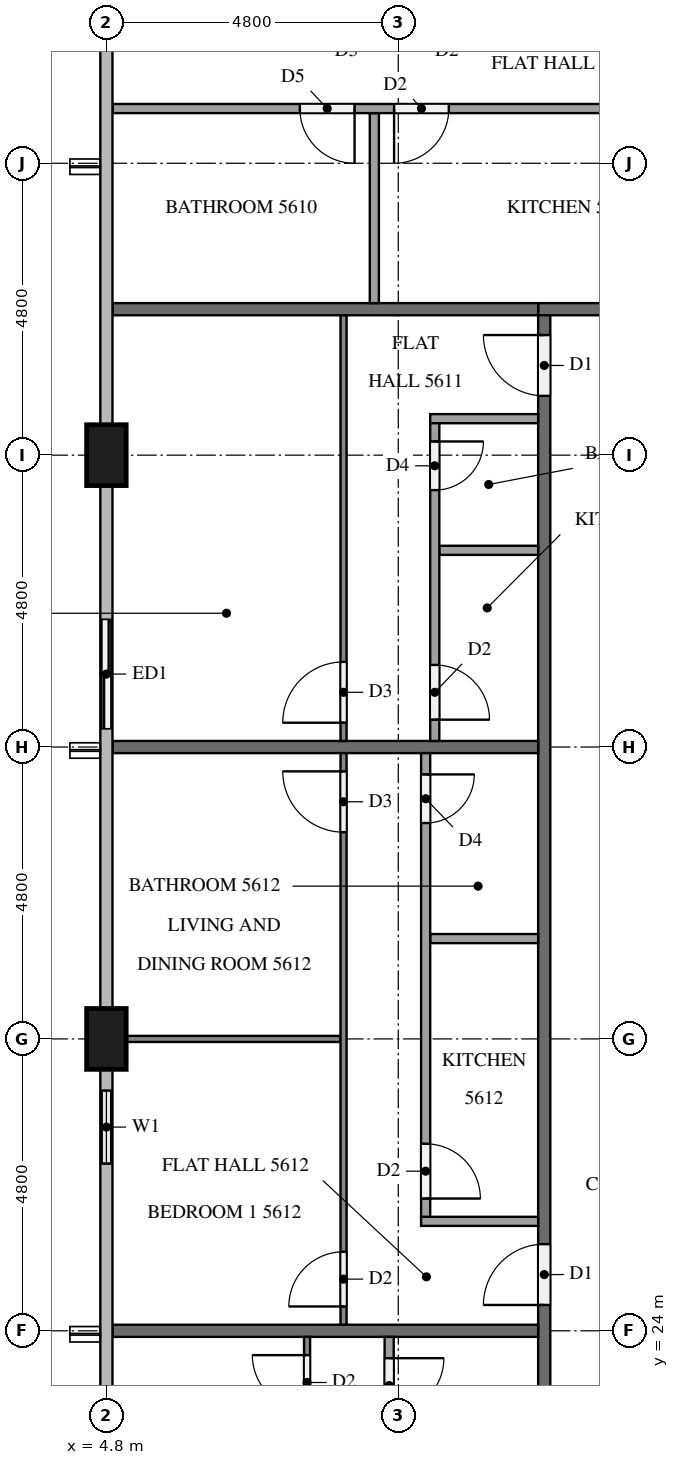
"""IFC4 building model, lengths in metres.
Left out: names, types, materials, properties, quantities, classifications, styles, units other than length and angle.
Written with IfcOpenShell. Run it as: python <this file> out.ifc"""

import sys

from ifc_helpers import new_model, si_unit, direction, frame, frame_2d, origin, origin_2d, place, context, subcontext, project, spatial, rectangle, extrude, element, fill, save


model = new_model("IFC4")
c1 = context("Model", 3, precision=1e-05, world=origin(), true_north=direction((0.0, 1.0)))
c2 = subcontext(c1, "Body", "Model", "MODEL_VIEW")
j1 = project(units=[si_unit("LENGTHUNIT", "METRE"), si_unit("PLANEANGLEUNIT", "RADIAN")], contexts=[c1])
p1 = place(None, origin())
s1 = spatial("IfcSite", under=j1, at=p1, CompositionType="ELEMENT")
p2 = place(p1, origin())
s2 = spatial("IfcBuilding", under=s1, at=p2, CompositionType="ELEMENT")
p3 = place(p2, frame((0.0, 0.0, 215.8)))
s3 = spatial("IfcBuildingStorey", under=s2, at=p3, CompositionType="ELEMENT", Elevation=215.8)
for number, where, z_axis, x_axis in (
    (1, (4.8, 38.4, 0.0), (0.0, 0.0, 1.0), (0.0, 1.0, 0.0)),
    (2, (4.8, 28.8, 0.0), (0.0, 0.0, 1.0), (0.0, 1.0, 0.0)),
):
    element("IfcColumn", number, at=place(p3, frame(where, z_axis=z_axis, x_axis=x_axis)), inside=s3, PredefinedType="COLUMN", context=c2, shape_type="SweptSolid", body=[
        extrude(rectangle(XDim=1.0, YDim=0.65, at=origin_2d()), origin(), (0.0, 0.0, 1.0), 3.2),
    ])
p4 = place(p3, frame((4.8, 36.0, 0.0), z_axis=(0.0, 0.0, 1.0), x_axis=(0.0, -1.0, 0.0)))
e3 = element("IfcWall", 3, at=p4, inside=s3, PredefinedType="SOLIDWALL", context=c2, shape_type="SweptSolid", body=[
    extrude(rectangle(XDim=2.4, YDim=0.15, at=frame_2d((1.2, 0.0))), origin(), (0.0, 0.0, 1.0), 3.2),
])
p5 = place(p4, frame((0.3, 0.0, 0.0)))
e4 = element("IfcOpeningElement", 4, at=p5, cuts=e3, PredefinedType="OPENING", context=c2, shape_type="SweptSolid", body=[
    extrude(rectangle(XDim=1.8, YDim=2.4, at=frame_2d((0.9, 1.2))), frame((0.0, 0.085, 0.0), z_axis=(0.0, -1.0, 0.0), x_axis=(1.0, 0.0, 0.0)), (0.0, 0.0, 1.0), 0.17),
])
p6 = place(p3, frame((4.8, 28.3, 0.0), z_axis=(0.0, 0.0, 1.0), x_axis=(0.0, -1.0, 0.0)))
e5 = element("IfcWall", 5, at=p6, inside=s3, PredefinedType="SOLIDWALL", context=c2, shape_type="SweptSolid", body=[
    extrude(rectangle(XDim=1.9, YDim=0.15, at=frame_2d((0.95, 0.0))), origin(), (0.0, 0.0, 1.0), 3.2),
])
p7 = place(p6, frame((0.35, 0.0, 0.9)))
e6 = element("IfcOpeningElement", 6, at=p7, cuts=e5, PredefinedType="OPENING", context=c2, shape_type="SweptSolid", body=[
    extrude(rectangle(XDim=1.2, YDim=1.4, at=frame_2d((0.6, 0.7))), frame((0.0, 0.085, 0.0), z_axis=(0.0, -1.0, 0.0), x_axis=(1.0, 0.0, 0.0)), (0.0, 0.0, 1.0), 0.17),
])
p8 = place(p3, frame((11.9, 40.8, 0.0), z_axis=(0.0, 0.0, 1.0), x_axis=(1.0, 0.0, 0.0)))
e7 = element("IfcWall", 7, at=p8, inside=s3, PredefinedType="PARTITIONING", context=c2, shape_type="SweptSolid", body=[
    extrude(rectangle(XDim=38.6, YDim=0.2, at=frame_2d((19.3, 0.0))), origin(), (0.0, 0.0, 1.0), 3.2),
])
p9 = place(p8, frame((36.525, 0.0, 0.0)))
e8 = element("IfcOpeningElement", 8, at=p9, cuts=e7, PredefinedType="OPENING", context=c2, shape_type="SweptSolid", body=[
    extrude(rectangle(XDim=1.0, YDim=2.1, at=frame_2d((0.5, 1.05))), frame((0.0, 0.11, 0.0), z_axis=(0.0, -1.0, 0.0), x_axis=(1.0, 0.0, 0.0)), (0.0, 0.0, 1.0), 0.22),
])
p10 = place(p8, frame((29.325, 0.0, 0.0)))
e9 = element("IfcOpeningElement", 9, at=p10, cuts=e7, PredefinedType="OPENING", context=c2, shape_type="SweptSolid", body=[
    extrude(rectangle(XDim=1.0, YDim=2.1, at=frame_2d((0.5, 1.05))), frame((0.0, 0.11, 0.0), z_axis=(0.0, -1.0, 0.0), x_axis=(1.0, 0.0, 0.0)), (0.0, 0.0, 1.0), 0.22),
])
p11 = place(p8, frame((12.525, 0.0, 0.0)))
e10 = element("IfcOpeningElement", 10, at=p11, cuts=e7, PredefinedType="OPENING", context=c2, shape_type="SweptSolid", body=[
    extrude(rectangle(XDim=1.0, YDim=2.1, at=frame_2d((0.5, 1.05))), frame((0.0, 0.11, 0.0), z_axis=(0.0, -1.0, 0.0), x_axis=(1.0, 0.0, 0.0)), (0.0, 0.0, 1.0), 0.22),
])
p12 = place(p8, frame((10.625, 0.0, 0.0)))
e11 = element("IfcOpeningElement", 11, at=p12, cuts=e7, PredefinedType="OPENING", context=c2, shape_type="SweptSolid", body=[
    extrude(rectangle(XDim=1.1, YDim=2.1, at=frame_2d((0.55, 1.05))), frame((0.0, 0.11, 0.0), z_axis=(0.0, -1.0, 0.0), x_axis=(1.0, 0.0, 0.0)), (0.0, 0.0, 1.0), 0.22),
])
p13 = place(p3, frame((12.0, 12.1, 0.0), z_axis=(0.0, 0.0, 1.0), x_axis=(0.0, 1.0, 0.0)))
e12 = element("IfcWall", 12, at=p13, inside=s3, PredefinedType="PARTITIONING", context=c2, shape_type="SweptSolid", body=[
    extrude(rectangle(XDim=28.6, YDim=0.2, at=frame_2d((14.3, 0.0))), origin(), (0.0, 0.0, 1.0), 3.2),
])
p14 = place(p13, frame((27.275, 0.0, 0.0)))
e13 = element("IfcOpeningElement", 13, at=p14, cuts=e12, PredefinedType="OPENING", context=c2, shape_type="SweptSolid", body=[
    extrude(rectangle(XDim=1.0, YDim=2.1, at=frame_2d((0.5, 1.05))), frame((0.0, 0.11, 0.0), z_axis=(0.0, -1.0, 0.0), x_axis=(1.0, 0.0, 0.0)), (0.0, 0.0, 1.0), 0.22),
])
p15 = place(p13, frame((12.325, 0.0, 0.0)))
e14 = element("IfcOpeningElement", 14, at=p15, cuts=e12, PredefinedType="OPENING", context=c2, shape_type="SweptSolid", body=[
    extrude(rectangle(XDim=1.0, YDim=2.1, at=frame_2d((0.5, 1.05))), frame((0.0, 0.11, 0.0), z_axis=(0.0, -1.0, 0.0), x_axis=(1.0, 0.0, 0.0)), (0.0, 0.0, 1.0), 0.22),
])
p16 = place(p13, frame((2.725, 0.0, 0.0)))
e15 = element("IfcOpeningElement", 15, at=p16, cuts=e12, PredefinedType="OPENING", context=c2, shape_type="SweptSolid", body=[
    extrude(rectangle(XDim=1.0, YDim=2.1, at=frame_2d((0.5, 1.05))), frame((0.0, 0.11, 0.0), z_axis=(0.0, -1.0, 0.0), x_axis=(1.0, 0.0, 0.0)), (0.0, 0.0, 1.0), 0.22),
])
p17 = place(p13, frame((0.875, 0.0, 0.0)))
e16 = element("IfcOpeningElement", 16, at=p17, cuts=e12, PredefinedType="OPENING", context=c2, shape_type="SweptSolid", body=[
    extrude(rectangle(XDim=1.0, YDim=2.1, at=frame_2d((0.5, 1.05))), frame((0.0, 0.11, 0.0), z_axis=(0.0, -1.0, 0.0), x_axis=(1.0, 0.0, 0.0)), (0.0, 0.0, 1.0), 0.22),
])
for number, where, z_axis, x_axis in (
    (17, (4.9, 40.8, 0.0), (0.0, 0.0, 1.0), (1.0, 0.0, 0.0)),
    (18, (4.9, 33.6, 0.0), (0.0, 0.0, 1.0), (1.0, 0.0, 0.0)),
    (19, (4.9, 24.0, 0.0), (0.0, 0.0, 1.0), (1.0, 0.0, 0.0)),
):
    element("IfcWall", number, at=place(p3, frame(where, z_axis=z_axis, x_axis=x_axis)), inside=s3, PredefinedType="PARTITIONING", context=c2, shape_type="SweptSolid", body=[
        extrude(rectangle(XDim=7.0, YDim=0.2, at=frame_2d((3.5, 0.0))), origin(), (0.0, 0.0, 1.0), 3.2),
    ])
p18 = place(p3, frame((9.206, 40.9, 0.0), z_axis=(0.0, 0.0, 1.0), x_axis=(0.0, 1.0, 0.0)))
e20 = element("IfcWall", 20, at=p18, inside=s3, PredefinedType="PARTITIONING", context=c2, shape_type="SweptSolid", body=[
    extrude(rectangle(XDim=3.125, YDim=0.15, at=frame_2d((1.562, 0.0))), origin(), (0.0, 0.0, 1.0), 3.2),
])
p19 = place(p3, frame((22.125, 44.1, 0.0), z_axis=(0.0, 0.0, 1.0), x_axis=(-1.0, 0.0, 0.0)))
e21 = element("IfcWall", 21, at=p19, inside=s3, PredefinedType="PARTITIONING", context=c2, shape_type="SweptSolid", body=[
    extrude(rectangle(XDim=17.225, YDim=0.15, at=frame_2d((8.613, 0.0))), origin(), (0.0, 0.0, 1.0), 3.2),
])
p20 = place(p19, frame((2.105, 0.0, 0.0)))
e22 = element("IfcOpeningElement", 22, at=p20, cuts=e21, PredefinedType="OPENING", context=c2, shape_type="SweptSolid", body=[
    extrude(rectangle(XDim=0.8, YDim=2.1, at=frame_2d((0.4, 1.05))), frame((0.0, 0.085, 0.0), z_axis=(0.0, -1.0, 0.0), x_axis=(1.0, 0.0, 0.0)), (0.0, 0.0, 1.0), 0.17),
])
p21 = place(p19, frame((3.555, 0.0, 0.0)))
e23 = element("IfcOpeningElement", 23, at=p21, cuts=e21, PredefinedType="OPENING", context=c2, shape_type="SweptSolid", body=[
    extrude(rectangle(XDim=0.8, YDim=2.1, at=frame_2d((0.4, 1.05))), frame((0.0, 0.085, 0.0), z_axis=(0.0, -1.0, 0.0), x_axis=(1.0, 0.0, 0.0)), (0.0, 0.0, 1.0), 0.17),
])
p22 = place(p19, frame((11.694, 0.0, 0.0)))
e24 = element("IfcOpeningElement", 24, at=p22, cuts=e21, PredefinedType="OPENING", context=c2, shape_type="SweptSolid", body=[
    extrude(rectangle(XDim=0.9, YDim=2.1, at=frame_2d((0.45, 1.05))), frame((0.0, 0.085, 0.0), z_axis=(0.0, -1.0, 0.0), x_axis=(1.0, 0.0, 0.0)), (0.0, 0.0, 1.0), 0.17),
])
p23 = place(p19, frame((13.244, 0.0, 0.0)))
e25 = element("IfcOpeningElement", 25, at=p23, cuts=e21, PredefinedType="OPENING", context=c2, shape_type="SweptSolid", body=[
    extrude(rectangle(XDim=0.9, YDim=2.1, at=frame_2d((0.45, 1.05))), frame((0.0, 0.085, 0.0), z_axis=(0.0, -1.0, 0.0), x_axis=(1.0, 0.0, 0.0)), (0.0, 0.0, 1.0), 0.17),
])
p24 = place(p3, frame((8.7, 33.7, 0.0), z_axis=(0.0, 0.0, 1.0), x_axis=(0.0, 1.0, 0.0)))
e26 = element("IfcWall", 26, at=p24, inside=s3, PredefinedType="PARTITIONING", context=c2, shape_type="SweptSolid", body=[
    extrude(rectangle(XDim=7.0, YDim=0.1, at=frame_2d((3.5, 0.0))), origin(), (0.0, 0.0, 1.0), 3.2),
])
p25 = place(p24, frame((0.3, 0.0, 0.0)))
e27 = element("IfcOpeningElement", 27, at=p25, cuts=e26, PredefinedType="OPENING", context=c2, shape_type="SweptSolid", body=[
    extrude(rectangle(XDim=1.0, YDim=2.1, at=frame_2d((0.5, 1.05))), frame((0.0, 0.06, 0.0), z_axis=(0.0, -1.0, 0.0), x_axis=(1.0, 0.0, 0.0)), (0.0, 0.0, 1.0), 0.12),
])
p26 = place(p3, frame((11.9, 36.835, 0.0), z_axis=(0.0, 0.0, 1.0), x_axis=(-1.0, 0.0, 0.0)))
e28 = element("IfcWall", 28, at=p26, inside=s3, PredefinedType="PARTITIONING", context=c2, shape_type="SweptSolid", body=[
    extrude(rectangle(XDim=1.625, YDim=0.15, at=frame_2d((0.812, 0.0))), origin(), (0.0, 0.0, 1.0), 3.2),
])
p27 = place(p3, frame((11.9, 39.0, 0.0), z_axis=(0.0, 0.0, 1.0), x_axis=(-1.0, 0.0, 0.0)))
e29 = element("IfcWall", 29, at=p27, inside=s3, PredefinedType="PARTITIONING", context=c2, shape_type="SweptSolid", body=[
    extrude(rectangle(XDim=1.775, YDim=0.15, at=frame_2d((0.887, 0.0))), origin(), (0.0, 0.0, 1.0), 3.2),
])
p28 = place(p3, frame((10.2, 38.925, 0.0), z_axis=(0.0, 0.0, 1.0), x_axis=(0.0, -1.0, 0.0)))
e30 = element("IfcWall", 30, at=p28, inside=s3, PredefinedType="PARTITIONING", context=c2, shape_type="SweptSolid", body=[
    extrude(rectangle(XDim=5.225, YDim=0.15, at=frame_2d((2.613, 0.0))), origin(), (0.0, 0.0, 1.0), 3.2),
])
p29 = place(p28, frame((0.3, 0.0, 0.0)))
e31 = element("IfcOpeningElement", 31, at=p29, cuts=e30, PredefinedType="OPENING", context=c2, shape_type="SweptSolid", body=[
    extrude(rectangle(XDim=0.8, YDim=2.1, at=frame_2d((0.4, 1.05))), frame((0.0, 0.085, 0.0), z_axis=(0.0, -1.0, 0.0), x_axis=(1.0, 0.0, 0.0)), (0.0, 0.0, 1.0), 0.17),
])
p30 = place(p28, frame((3.975, 0.0, 0.0)))
e32 = element("IfcOpeningElement", 32, at=p30, cuts=e30, PredefinedType="OPENING", context=c2, shape_type="SweptSolid", body=[
    extrude(rectangle(XDim=0.9, YDim=2.1, at=frame_2d((0.45, 1.05))), frame((0.0, 0.085, 0.0), z_axis=(0.0, -1.0, 0.0), x_axis=(1.0, 0.0, 0.0)), (0.0, 0.0, 1.0), 0.17),
])
p31 = place(p3, frame((8.65, 28.8, 0.0), z_axis=(0.0, 0.0, 1.0), x_axis=(-1.0, 0.0, 0.0)))
e33 = element("IfcWall", 33, at=p31, inside=s3, PredefinedType="PARTITIONING", context=c2, shape_type="SweptSolid", body=[
    extrude(rectangle(XDim=3.525, YDim=0.1, at=frame_2d((1.762, 0.0))), origin(), (0.0, 0.0, 1.0), 3.2),
])
p32 = place(p3, frame((8.7, 24.1, 0.0), z_axis=(0.0, 0.0, 1.0), x_axis=(0.0, 1.0, 0.0)))
e34 = element("IfcWall", 34, at=p32, inside=s3, PredefinedType="PARTITIONING", context=c2, shape_type="SweptSolid", body=[
    extrude(rectangle(XDim=9.4, YDim=0.1, at=frame_2d((4.7, 0.0))), origin(), (0.0, 0.0, 1.0), 3.2),
])
p33 = place(p32, frame((0.3, 0.0, 0.0)))
e35 = element("IfcOpeningElement", 35, at=p33, cuts=e34, PredefinedType="OPENING", context=c2, shape_type="SweptSolid", body=[
    extrude(rectangle(XDim=0.9, YDim=2.1, at=frame_2d((0.45, 1.05))), frame((0.0, 0.06, 0.0), z_axis=(0.0, -1.0, 0.0), x_axis=(1.0, 0.0, 0.0)), (0.0, 0.0, 1.0), 0.12),
])
p34 = place(p32, frame((8.1, 0.0, 0.0)))
e36 = element("IfcOpeningElement", 36, at=p34, cuts=e34, PredefinedType="OPENING", context=c2, shape_type="SweptSolid", body=[
    extrude(rectangle(XDim=1.0, YDim=2.1, at=frame_2d((0.5, 1.05))), frame((0.0, 0.06, 0.0), z_axis=(0.0, -1.0, 0.0), x_axis=(1.0, 0.0, 0.0)), (0.0, 0.0, 1.0), 0.12),
])
p35 = place(p3, frame((11.9, 30.45, 0.0), z_axis=(0.0, 0.0, 1.0), x_axis=(-1.0, 0.0, 0.0)))
e37 = element("IfcWall", 37, at=p35, inside=s3, PredefinedType="PARTITIONING", context=c2, shape_type="SweptSolid", body=[
    extrude(rectangle(XDim=1.775, YDim=0.15, at=frame_2d((0.887, 0.0))), origin(), (0.0, 0.0, 1.0), 3.2),
])
p36 = place(p3, frame((11.9, 25.8, 0.0), z_axis=(0.0, 0.0, 1.0), x_axis=(-1.0, 0.0, 0.0)))
e38 = element("IfcWall", 38, at=p36, inside=s3, PredefinedType="PARTITIONING", context=c2, shape_type="SweptSolid", body=[
    extrude(rectangle(XDim=1.925, YDim=0.15, at=frame_2d((0.962, 0.0))), origin(), (0.0, 0.0, 1.0), 3.2),
])
p37 = place(p3, frame((10.05, 33.5, 0.0), z_axis=(0.0, 0.0, 1.0), x_axis=(0.0, -1.0, 0.0)))
e39 = element("IfcWall", 39, at=p37, inside=s3, PredefinedType="PARTITIONING", context=c2, shape_type="SweptSolid", body=[
    extrude(rectangle(XDim=7.625, YDim=0.15, at=frame_2d((3.812, 0.0))), origin(), (0.0, 0.0, 1.0), 3.2),
])
p38 = place(p37, frame((6.425, 0.0, 0.0)))
e40 = element("IfcOpeningElement", 40, at=p38, cuts=e39, PredefinedType="OPENING", context=c2, shape_type="SweptSolid", body=[
    extrude(rectangle(XDim=0.9, YDim=2.1, at=frame_2d((0.45, 1.05))), frame((0.0, 0.085, 0.0), z_axis=(0.0, -1.0, 0.0), x_axis=(1.0, 0.0, 0.0)), (0.0, 0.0, 1.0), 0.17),
])
p39 = place(p37, frame((0.35, 0.0, 0.0)))
e41 = element("IfcOpeningElement", 41, at=p39, cuts=e39, PredefinedType="OPENING", context=c2, shape_type="SweptSolid", body=[
    extrude(rectangle(XDim=0.8, YDim=2.1, at=frame_2d((0.4, 1.05))), frame((0.0, 0.085, 0.0), z_axis=(0.0, -1.0, 0.0), x_axis=(1.0, 0.0, 0.0)), (0.0, 0.0, 1.0), 0.17),
])
p40 = place(p3, frame((8.1, 14.5, 0.0), z_axis=(0.0, 0.0, 1.0), x_axis=(0.0, 1.0, 0.0)))
e42 = element("IfcWall", 42, at=p40, inside=s3, PredefinedType="PARTITIONING", context=c2, shape_type="SweptSolid", body=[
    extrude(rectangle(XDim=9.4, YDim=0.1, at=frame_2d((4.7, 0.0))), origin(), (0.0, 0.0, 1.0), 3.2),
])
p41 = place(p40, frame((0.3, 0.0, 0.0)))
e43 = element("IfcOpeningElement", 43, at=p41, cuts=e42, PredefinedType="OPENING", context=c2, shape_type="SweptSolid", body=[
    extrude(rectangle(XDim=1.0, YDim=2.1, at=frame_2d((0.5, 1.05))), frame((0.0, 0.06, 0.0), z_axis=(0.0, -1.0, 0.0), x_axis=(1.0, 0.0, 0.0)), (0.0, 0.0, 1.0), 0.12),
])
p42 = place(p40, frame((8.2, 0.0, 0.0)))
e44 = element("IfcOpeningElement", 44, at=p42, cuts=e42, PredefinedType="OPENING", context=c2, shape_type="SweptSolid", body=[
    extrude(rectangle(XDim=0.9, YDim=2.1, at=frame_2d((0.45, 1.05))), frame((0.0, 0.06, 0.0), z_axis=(0.0, -1.0, 0.0), x_axis=(1.0, 0.0, 0.0)), (0.0, 0.0, 1.0), 0.12),
])
p43 = place(p3, frame((9.45, 23.9, 0.0), z_axis=(0.0, 0.0, 1.0), x_axis=(0.0, -1.0, 0.0)))
e45 = element("IfcWall", 45, at=p43, inside=s3, PredefinedType="PARTITIONING", context=c2, shape_type="SweptSolid", body=[
    extrude(rectangle(XDim=7.625, YDim=0.15, at=frame_2d((3.812, 0.0))), origin(), (0.0, 0.0, 1.0), 3.2),
])
p44 = place(p43, frame((6.525, 0.0, 0.0)))
e46 = element("IfcOpeningElement", 46, at=p44, cuts=e45, PredefinedType="OPENING", context=c2, shape_type="SweptSolid", body=[
    extrude(rectangle(XDim=0.8, YDim=2.1, at=frame_2d((0.4, 1.05))), frame((0.0, 0.085, 0.0), z_axis=(0.0, -1.0, 0.0), x_axis=(1.0, 0.0, 0.0)), (0.0, 0.0, 1.0), 0.17),
])
p45 = place(p43, frame((0.35, 0.0, 0.0)))
e47 = element("IfcOpeningElement", 47, at=p45, cuts=e45, PredefinedType="OPENING", context=c2, shape_type="SweptSolid", body=[
    extrude(rectangle(XDim=0.9, YDim=2.1, at=frame_2d((0.45, 1.05))), frame((0.0, 0.085, 0.0), z_axis=(0.0, -1.0, 0.0), x_axis=(1.0, 0.0, 0.0)), (0.0, 0.0, 1.0), 0.17),
])
p46 = place(p5, origin())
e48 = element("IfcDoor", 48, at=p46, inside=s3, OperationType="SLIDING_TO_LEFT", PredefinedType="DOOR", context=c2, shape_type="SweptSolid", body=[
    extrude(rectangle(XDim=1.8, YDim=2.4, at=frame_2d((0.9, 1.2))), frame((0.0, 0.025, 0.0), z_axis=(0.0, -1.0, 0.0), x_axis=(1.0, 0.0, 0.0)), (0.0, 0.0, 1.0), 0.05),
])
fill(e4, e48)
p47 = place(p7, origin())
e49 = element("IfcWindow", 49, at=p47, inside=s3, PartitioningType="SINGLE_PANEL", PredefinedType="WINDOW", context=c2, shape_type="SweptSolid", body=[
    extrude(rectangle(XDim=1.2, YDim=1.4, at=frame_2d((0.6, 0.7))), frame((0.0, 0.03, 0.0), z_axis=(0.0, -1.0, 0.0), x_axis=(1.0, 0.0, 0.0)), (0.0, 0.0, 1.0), 0.06),
])
fill(e6, e49)
p48 = place(p14, origin())
e50 = element("IfcDoor", 50, at=p48, inside=s3, OperationType="SINGLE_SWING_RIGHT", PredefinedType="DOOR", context=c2, shape_type="SweptSolid", body=[
    extrude(rectangle(XDim=1.0, YDim=2.1, at=frame_2d((0.5, 1.05))), frame((0.0, 0.025, 0.0), z_axis=(0.0, -1.0, 0.0), x_axis=(1.0, 0.0, 0.0)), (0.0, 0.0, 1.0), 0.05),
])
fill(e13, e50)
p49 = place(p15, origin())
e51 = element("IfcDoor", 51, at=p49, inside=s3, OperationType="SINGLE_SWING_LEFT", PredefinedType="DOOR", context=c2, shape_type="SweptSolid", body=[
    extrude(rectangle(XDim=1.0, YDim=2.1, at=frame_2d((0.5, 1.05))), frame((0.0, 0.025, 0.0), z_axis=(0.0, -1.0, 0.0), x_axis=(1.0, 0.0, 0.0)), (0.0, 0.0, 1.0), 0.05),
])
fill(e14, e51)
p50 = place(p22, origin())
e52 = element("IfcDoor", 52, at=p50, inside=s3, OperationType="SINGLE_SWING_RIGHT", PredefinedType="DOOR", context=c2, shape_type="SweptSolid", body=[
    extrude(rectangle(XDim=0.9, YDim=2.1, at=frame_2d((0.45, 1.05))), frame((0.0, 0.025, 0.0), z_axis=(0.0, -1.0, 0.0), x_axis=(1.0, 0.0, 0.0)), (0.0, 0.0, 1.0), 0.05),
])
fill(e24, e52)
p51 = place(p23, origin())
e53 = element("IfcDoor", 53, at=p51, inside=s3, OperationType="SINGLE_SWING_LEFT", PredefinedType="DOOR", context=c2, shape_type="SweptSolid", body=[
    extrude(rectangle(XDim=0.9, YDim=2.1, at=frame_2d((0.45, 1.05))), frame((0.0, 0.025, 0.0), z_axis=(0.0, -1.0, 0.0), x_axis=(1.0, 0.0, 0.0)), (0.0, 0.0, 1.0), 0.05),
])
fill(e25, e53)
p52 = place(p25, origin())
e54 = element("IfcDoor", 54, at=p52, inside=s3, OperationType="SINGLE_SWING_LEFT", PredefinedType="DOOR", context=c2, shape_type="SweptSolid", body=[
    extrude(rectangle(XDim=1.0, YDim=2.1, at=frame_2d((0.5, 1.05))), frame((0.0, 0.025, 0.0), z_axis=(0.0, -1.0, 0.0), x_axis=(1.0, 0.0, 0.0)), (0.0, 0.0, 1.0), 0.05),
])
fill(e27, e54)
p53 = place(p29, origin())
e55 = element("IfcDoor", 55, at=p53, inside=s3, OperationType="SINGLE_SWING_LEFT", PredefinedType="DOOR", context=c2, shape_type="SweptSolid", body=[
    extrude(rectangle(XDim=0.8, YDim=2.1, at=frame_2d((0.4, 1.05))), frame((0.0, 0.025, 0.0), z_axis=(0.0, -1.0, 0.0), x_axis=(1.0, 0.0, 0.0)), (0.0, 0.0, 1.0), 0.05),
])
fill(e31, e55)
p54 = place(p30, origin())
e56 = element("IfcDoor", 56, at=p54, inside=s3, OperationType="SINGLE_SWING_RIGHT", PredefinedType="DOOR", context=c2, shape_type="SweptSolid", body=[
    extrude(rectangle(XDim=0.9, YDim=2.1, at=frame_2d((0.45, 1.05))), frame((0.0, 0.025, 0.0), z_axis=(0.0, -1.0, 0.0), x_axis=(1.0, 0.0, 0.0)), (0.0, 0.0, 1.0), 0.05),
])
fill(e32, e56)
p55 = place(p33, origin())
e57 = element("IfcDoor", 57, at=p55, inside=s3, OperationType="SINGLE_SWING_LEFT", PredefinedType="DOOR", context=c2, shape_type="SweptSolid", body=[
    extrude(rectangle(XDim=0.9, YDim=2.1, at=frame_2d((0.45, 1.05))), frame((0.0, 0.025, 0.0), z_axis=(0.0, -1.0, 0.0), x_axis=(1.0, 0.0, 0.0)), (0.0, 0.0, 1.0), 0.05),
])
fill(e35, e57)
p56 = place(p34, origin())
e58 = element("IfcDoor", 58, at=p56, inside=s3, OperationType="SINGLE_SWING_RIGHT", PredefinedType="DOOR", context=c2, shape_type="SweptSolid", body=[
    extrude(rectangle(XDim=1.0, YDim=2.1, at=frame_2d((0.5, 1.05))), frame((0.0, 0.025, 0.0), z_axis=(0.0, -1.0, 0.0), x_axis=(1.0, 0.0, 0.0)), (0.0, 0.0, 1.0), 0.05),
])
fill(e36, e58)
p57 = place(p38, origin())
e59 = element("IfcDoor", 59, at=p57, inside=s3, OperationType="SINGLE_SWING_RIGHT", PredefinedType="DOOR", context=c2, shape_type="SweptSolid", body=[
    extrude(rectangle(XDim=0.9, YDim=2.1, at=frame_2d((0.45, 1.05))), frame((0.0, 0.025, 0.0), z_axis=(0.0, -1.0, 0.0), x_axis=(1.0, 0.0, 0.0)), (0.0, 0.0, 1.0), 0.05),
])
fill(e40, e59)
p58 = place(p39, origin())
e60 = element("IfcDoor", 60, at=p58, inside=s3, OperationType="SINGLE_SWING_LEFT", PredefinedType="DOOR", context=c2, shape_type="SweptSolid", body=[
    extrude(rectangle(XDim=0.8, YDim=2.1, at=frame_2d((0.4, 1.05))), frame((0.0, 0.025, 0.0), z_axis=(0.0, -1.0, 0.0), x_axis=(1.0, 0.0, 0.0)), (0.0, 0.0, 1.0), 0.05),
])
fill(e41, e60)
p59 = place(p42, origin())
e61 = element("IfcDoor", 61, at=p59, inside=s3, OperationType="SINGLE_SWING_RIGHT", PredefinedType="DOOR", context=c2, shape_type="SweptSolid", body=[
    extrude(rectangle(XDim=0.9, YDim=2.1, at=frame_2d((0.45, 1.05))), frame((0.0, 0.025, 0.0), z_axis=(0.0, -1.0, 0.0), x_axis=(1.0, 0.0, 0.0)), (0.0, 0.0, 1.0), 0.05),
])
fill(e44, e61)
p60 = place(p45, origin())
e62 = element("IfcDoor", 62, at=p60, inside=s3, OperationType="SINGLE_SWING_LEFT", PredefinedType="DOOR", context=c2, shape_type="SweptSolid", body=[
    extrude(rectangle(XDim=0.9, YDim=2.1, at=frame_2d((0.45, 1.05))), frame((0.0, 0.025, 0.0), z_axis=(0.0, -1.0, 0.0), x_axis=(1.0, 0.0, 0.0)), (0.0, 0.0, 1.0), 0.05),
])
fill(e47, e62)
save(model, sys.argv[1])
